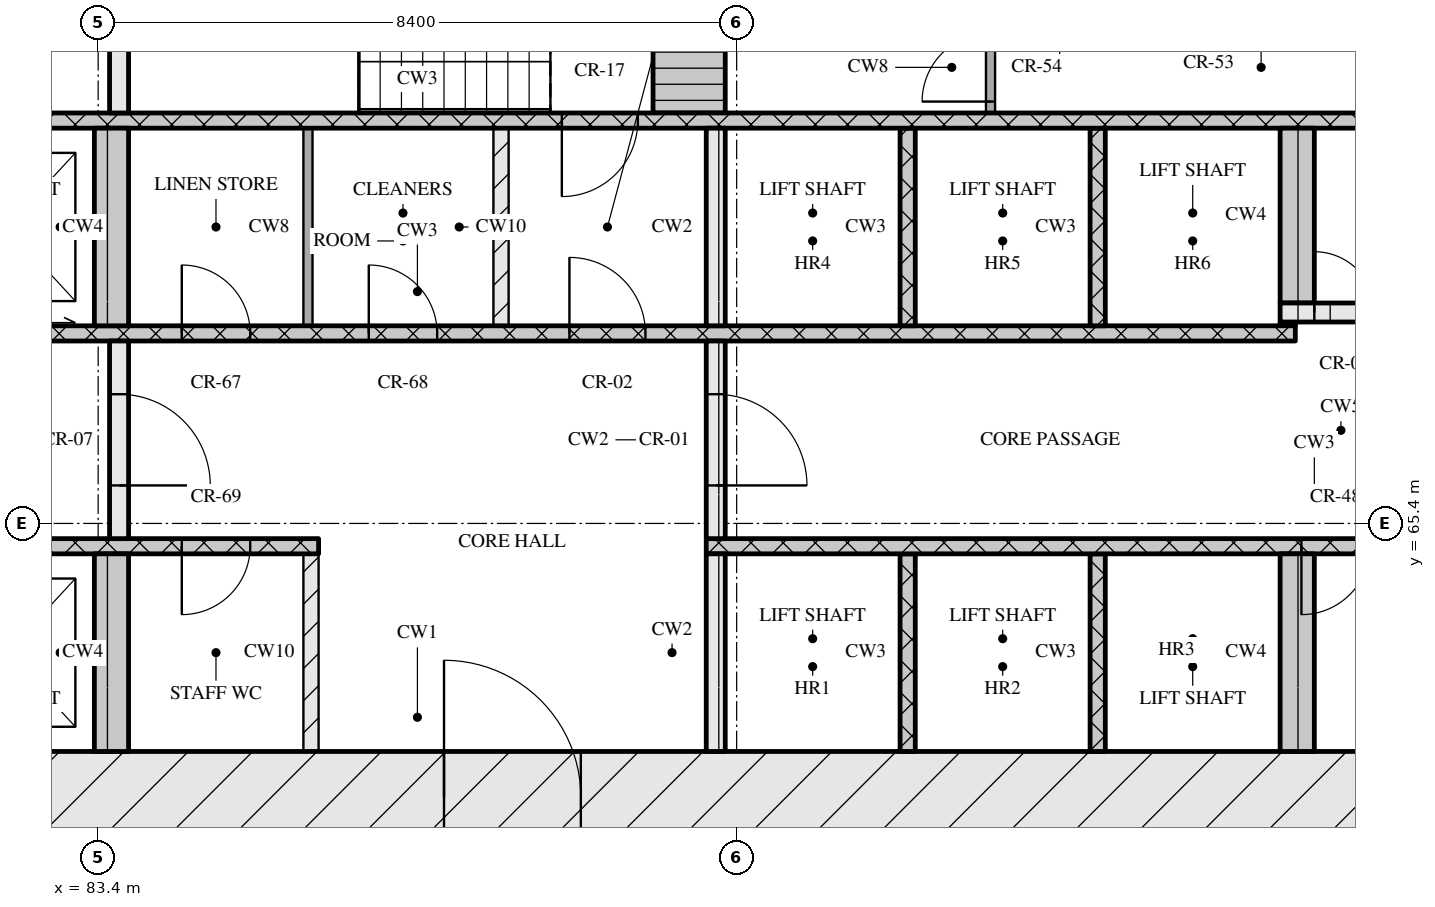
"""IFC4 building model, lengths in metres.
Left out: names, types, materials, properties, quantities, classifications, styles, units other than length and angle.
Written with IfcOpenShell. Run it as: python <this file> out.ifc"""

import sys

from ifc_helpers import new_model, si_unit, direction, frame, frame_2d, origin, place, context, subcontext, project, spatial, rectangle, extrude, element, fill, save


model = new_model("IFC4")
c1 = context("Model", 3, precision=1e-05, world=origin(), true_north=direction((0.0, 1.0)))
c2 = subcontext(c1, "Body", "Model", "MODEL_VIEW")
j1 = project(units=[si_unit("LENGTHUNIT", "METRE"), si_unit("PLANEANGLEUNIT", "RADIAN")], contexts=[c1])
p1 = place(None, origin())
s1 = spatial("IfcSite", under=j1, at=p1, CompositionType="ELEMENT")
p2 = place(p1, origin())
s2 = spatial("IfcBuilding", under=s1, at=p2, CompositionType="ELEMENT")
p3 = place(p2, frame((0.0, 0.0, 58.8)))
s3 = spatial("IfcBuildingStorey", under=s2, at=p3, CompositionType="ELEMENT", Elevation=58.8)
p4 = place(p3, frame((66.6, 61.8, 0.0), z_axis=(0.0, 0.0, 1.0), x_axis=(1.0, 0.0, 0.0)))
e1 = element("IfcWall", 1, at=p4, inside=s3, PredefinedType="SOLIDWALL", context=c2, shape_type="SweptSolid", body=[
    extrude(rectangle(XDim=42.0, YDim=1.2, at=frame_2d((21.0, 0.0))), origin(), (0.0, 0.0, 1.0), 3.32),
])
p5 = place(p4, frame((21.35, 0.0, 0.0)))
e2 = element("IfcOpeningElement", 2, at=p5, cuts=e1, PredefinedType="OPENING", context=c2, shape_type="SweptSolid", body=[
    extrude(rectangle(XDim=1.8, YDim=2.1, at=frame_2d((0.9, 1.05))), frame((0.0, 0.61, 0.0), z_axis=(0.0, -1.0, 0.0), x_axis=(1.0, 0.0, 0.0)), (0.0, 0.0, 1.0), 1.22),
])
p6 = place(p3, frame((83.575, 62.4, 0.0), z_axis=(0.0, 0.0, 1.0), x_axis=(0.0, 1.0, 0.0)))
e3 = element("IfcWall", 3, at=p6, inside=s3, PredefinedType="SOLIDWALL", context=c2, shape_type="SweptSolid", body=[
    extrude(rectangle(XDim=2.6, YDim=0.45, at=frame_2d((1.3, 0.0))), origin(), (0.0, 0.0, 1.0), 3.32),
])
p7 = place(p3, frame((86.2, 62.4, 0.0), z_axis=(0.0, 0.0, 1.0), x_axis=(0.0, 1.0, 0.0)))
e4 = element("IfcWall", 4, at=p7, inside=s3, PredefinedType="PARTITIONING", context=c2, shape_type="SweptSolid", body=[
    extrude(rectangle(XDim=2.6, YDim=0.2, at=frame_2d((1.3, 0.0))), origin(), (0.0, 0.0, 1.0), 3.32),
])
p8 = place(p3, frame((91.525, 62.4, 0.0), z_axis=(0.0, 0.0, 1.0), x_axis=(0.0, 1.0, 0.0)))
e5 = element("IfcWall", 5, at=p8, inside=s3, PredefinedType="SOLIDWALL", context=c2, shape_type="SweptSolid", body=[
    extrude(rectangle(XDim=2.6, YDim=0.25, at=frame_2d((1.3, 0.0))), origin(), (0.0, 0.0, 1.0), 3.32),
])
for number, where, z_axis, x_axis in (
    (6, (94.05, 62.4, 0.0), (0.0, 0.0, 1.0), (0.0, 1.0, 0.0)),
    (7, (96.55, 62.4, 0.0), (0.0, 0.0, 1.0), (0.0, 1.0, 0.0)),
):
    element("IfcWall", number, at=place(p3, frame(where, z_axis=z_axis, x_axis=x_axis)), inside=s3, PredefinedType="SOLIDWALL", context=c2, shape_type="SweptSolid", body=[
        extrude(rectangle(XDim=2.6, YDim=0.2, at=frame_2d((1.3, 0.0))), origin(), (0.0, 0.0, 1.0), 3.32),
    ])
p9 = place(p3, frame((99.175, 62.4, 0.0), z_axis=(0.0, 0.0, 1.0), x_axis=(0.0, 1.0, 0.0)))
e8 = element("IfcWall", 8, at=p9, inside=s3, PredefinedType="SOLIDWALL", context=c2, shape_type="SweptSolid", body=[
    extrude(rectangle(XDim=2.6, YDim=0.45, at=frame_2d((1.3, 0.0))), origin(), (0.0, 0.0, 1.0), 3.32),
])
p10 = place(p3, frame((67.8, 65.1, 0.0), z_axis=(0.0, 0.0, 1.0), x_axis=(1.0, 0.0, 0.0)))
e9 = element("IfcWall", 9, at=p10, inside=s3, PredefinedType="SOLIDWALL", context=c2, shape_type="SweptSolid", body=[
    extrude(rectangle(XDim=18.5, YDim=0.2, at=frame_2d((9.25, 0.0))), origin(), (0.0, 0.0, 1.0), 3.32),
])
p11 = place(p10, frame((7.27, 0.0, 0.0)))
e10 = element("IfcOpeningElement", 10, at=p11, cuts=e9, PredefinedType="OPENING", context=c2, shape_type="SweptSolid", body=[
    extrude(rectangle(XDim=0.9, YDim=2.1, at=frame_2d((0.45, 1.05))), frame((0.0, 0.11, 0.0), z_axis=(0.0, -1.0, 0.0), x_axis=(1.0, 0.0, 0.0)), (0.0, 0.0, 1.0), 0.22),
])
p12 = place(p10, frame((8.85, 0.0, 0.0)))
e11 = element("IfcOpeningElement", 11, at=p12, cuts=e9, PredefinedType="OPENING", context=c2, shape_type="SweptSolid", body=[
    extrude(rectangle(XDim=1.1, YDim=2.1, at=frame_2d((0.55, 1.05))), frame((0.0, 0.11, 0.0), z_axis=(0.0, -1.0, 0.0), x_axis=(1.0, 0.0, 0.0)), (0.0, 0.0, 1.0), 0.22),
])
p13 = place(p10, frame((11.35, 0.0, 0.0)))
e12 = element("IfcOpeningElement", 12, at=p13, cuts=e9, PredefinedType="OPENING", context=c2, shape_type="SweptSolid", body=[
    extrude(rectangle(XDim=1.1, YDim=2.1, at=frame_2d((0.55, 1.05))), frame((0.0, 0.11, 0.0), z_axis=(0.0, -1.0, 0.0), x_axis=(1.0, 0.0, 0.0)), (0.0, 0.0, 1.0), 0.22),
])
p14 = place(p10, frame((13.85, 0.0, 0.0)))
e13 = element("IfcOpeningElement", 13, at=p14, cuts=e9, PredefinedType="OPENING", context=c2, shape_type="SweptSolid", body=[
    extrude(rectangle(XDim=1.1, YDim=2.1, at=frame_2d((0.55, 1.05))), frame((0.0, 0.11, 0.0), z_axis=(0.0, -1.0, 0.0), x_axis=(1.0, 0.0, 0.0)), (0.0, 0.0, 1.0), 0.22),
])
p15 = place(p10, frame((16.7, 0.0, 0.0)))
e14 = element("IfcOpeningElement", 14, at=p15, cuts=e9, PredefinedType="OPENING", context=c2, shape_type="SweptSolid", body=[
    extrude(rectangle(XDim=0.9, YDim=2.1, at=frame_2d((0.45, 1.05))), frame((0.0, 0.11, 0.0), z_axis=(0.0, -1.0, 0.0), x_axis=(1.0, 0.0, 0.0)), (0.0, 0.0, 1.0), 0.22),
])
p16 = place(p3, frame((91.4, 65.1, 0.0), z_axis=(0.0, 0.0, 1.0), x_axis=(1.0, 0.0, 0.0)))
e15 = element("IfcWall", 15, at=p16, inside=s3, PredefinedType="SOLIDWALL", context=c2, shape_type="SweptSolid", body=[
    extrude(rectangle(XDim=16.0, YDim=0.2, at=frame_2d((8.0, 0.0))), origin(), (0.0, 0.0, 1.0), 3.32),
])
p17 = place(p16, frame((7.83, 0.0, 0.0)))
e16 = element("IfcOpeningElement", 16, at=p17, cuts=e15, PredefinedType="OPENING", context=c2, shape_type="SweptSolid", body=[
    extrude(rectangle(XDim=0.9, YDim=2.1, at=frame_2d((0.45, 1.05))), frame((0.0, 0.11, 0.0), z_axis=(0.0, -1.0, 0.0), x_axis=(1.0, 0.0, 0.0)), (0.0, 0.0, 1.0), 0.22),
])
p18 = place(p3, frame((83.675, 65.2, 0.0), z_axis=(0.0, 0.0, 1.0), x_axis=(0.0, 1.0, 0.0)))
e17 = element("IfcWall", 17, at=p18, inside=s3, PredefinedType="SOLIDWALL", context=c2, shape_type="SweptSolid", body=[
    extrude(rectangle(XDim=2.6, YDim=0.25, at=frame_2d((1.3, 0.0))), origin(), (0.0, 0.0, 1.0), 3.32),
])
p19 = place(p18, frame((0.7, 0.0, 0.0)))
e18 = element("IfcOpeningElement", 18, at=p19, cuts=e17, PredefinedType="OPENING", context=c2, shape_type="SweptSolid", body=[
    extrude(rectangle(XDim=1.2, YDim=2.1, at=frame_2d((0.6, 1.05))), frame((0.0, 0.135, 0.0), z_axis=(0.0, -1.0, 0.0), x_axis=(1.0, 0.0, 0.0)), (0.0, 0.0, 1.0), 0.27),
])
p20 = place(p3, frame((91.525, 65.2, 0.0), z_axis=(0.0, 0.0, 1.0), x_axis=(0.0, 1.0, 0.0)))
e19 = element("IfcWall", 19, at=p20, inside=s3, PredefinedType="SOLIDWALL", context=c2, shape_type="SweptSolid", body=[
    extrude(rectangle(XDim=2.6, YDim=0.25, at=frame_2d((1.3, 0.0))), origin(), (0.0, 0.0, 1.0), 3.32),
])
p21 = place(p20, frame((0.7, 0.0, 0.0)))
e20 = element("IfcOpeningElement", 20, at=p21, cuts=e19, PredefinedType="OPENING", context=c2, shape_type="SweptSolid", body=[
    extrude(rectangle(XDim=1.2, YDim=2.1, at=frame_2d((0.6, 1.05))), frame((0.0, 0.135, 0.0), z_axis=(0.0, -1.0, 0.0), x_axis=(1.0, 0.0, 0.0)), (0.0, 0.0, 1.0), 0.27),
])
p22 = place(p3, frame((76.05, 67.9, 0.0), z_axis=(0.0, 0.0, 1.0), x_axis=(1.0, 0.0, 0.0)))
e21 = element("IfcWall", 21, at=p22, inside=s3, PredefinedType="SOLIDWALL", context=c2, shape_type="SweptSolid", body=[
    extrude(rectangle(XDim=23.1, YDim=0.2, at=frame_2d((11.55, 0.0))), origin(), (0.0, 0.0, 1.0), 3.32),
])
p23 = place(p22, frame((0.6, 0.0, 0.0)))
e22 = element("IfcOpeningElement", 22, at=p23, cuts=e21, PredefinedType="OPENING", context=c2, shape_type="SweptSolid", body=[
    extrude(rectangle(XDim=1.1, YDim=2.1, at=frame_2d((0.55, 1.05))), frame((0.0, 0.11, 0.0), z_axis=(0.0, -1.0, 0.0), x_axis=(1.0, 0.0, 0.0)), (0.0, 0.0, 1.0), 0.22),
])
p24 = place(p22, frame((3.1, 0.0, 0.0)))
e23 = element("IfcOpeningElement", 23, at=p24, cuts=e21, PredefinedType="OPENING", context=c2, shape_type="SweptSolid", body=[
    extrude(rectangle(XDim=1.1, YDim=2.1, at=frame_2d((0.55, 1.05))), frame((0.0, 0.11, 0.0), z_axis=(0.0, -1.0, 0.0), x_axis=(1.0, 0.0, 0.0)), (0.0, 0.0, 1.0), 0.22),
])
p25 = place(p22, frame((5.6, 0.0, 0.0)))
e24 = element("IfcOpeningElement", 24, at=p25, cuts=e21, PredefinedType="OPENING", context=c2, shape_type="SweptSolid", body=[
    extrude(rectangle(XDim=1.1, YDim=2.1, at=frame_2d((0.55, 1.05))), frame((0.0, 0.11, 0.0), z_axis=(0.0, -1.0, 0.0), x_axis=(1.0, 0.0, 0.0)), (0.0, 0.0, 1.0), 0.22),
])
p26 = place(p22, frame((8.45, 0.0, 0.0)))
e25 = element("IfcOpeningElement", 25, at=p26, cuts=e21, PredefinedType="OPENING", context=c2, shape_type="SweptSolid", body=[
    extrude(rectangle(XDim=0.9, YDim=2.1, at=frame_2d((0.45, 1.05))), frame((0.0, 0.11, 0.0), z_axis=(0.0, -1.0, 0.0), x_axis=(1.0, 0.0, 0.0)), (0.0, 0.0, 1.0), 0.22),
])
p27 = place(p22, frame((10.91, 0.0, 0.0)))
e26 = element("IfcOpeningElement", 26, at=p27, cuts=e21, PredefinedType="OPENING", context=c2, shape_type="SweptSolid", body=[
    extrude(rectangle(XDim=0.9, YDim=2.1, at=frame_2d((0.45, 1.05))), frame((0.0, 0.11, 0.0), z_axis=(0.0, -1.0, 0.0), x_axis=(1.0, 0.0, 0.0)), (0.0, 0.0, 1.0), 0.22),
])
p28 = place(p22, frame((13.55, 0.0, 0.0)))
e27 = element("IfcOpeningElement", 27, at=p28, cuts=e21, PredefinedType="OPENING", context=c2, shape_type="SweptSolid", body=[
    extrude(rectangle(XDim=1.0, YDim=2.1, at=frame_2d((0.5, 1.05))), frame((0.0, 0.11, 0.0), z_axis=(0.0, -1.0, 0.0), x_axis=(1.0, 0.0, 0.0)), (0.0, 0.0, 1.0), 0.22),
])
p29 = place(p3, frame((83.575, 68.0, 0.0), z_axis=(0.0, 0.0, 1.0), x_axis=(0.0, 1.0, 0.0)))
e28 = element("IfcWall", 28, at=p29, inside=s3, PredefinedType="SOLIDWALL", context=c2, shape_type="SweptSolid", body=[
    extrude(rectangle(XDim=2.6, YDim=0.45, at=frame_2d((1.3, 0.0))), origin(), (0.0, 0.0, 1.0), 3.32),
])
p30 = place(p3, frame((86.16, 68.0, 0.0), z_axis=(0.0, 0.0, 1.0), x_axis=(0.0, 1.0, 0.0)))
e29 = element("IfcWall", 29, at=p30, inside=s3, PredefinedType="PARTITIONING", context=c2, shape_type="SweptSolid", body=[
    extrude(rectangle(XDim=2.6, YDim=0.12, at=frame_2d((1.3, 0.0))), origin(), (0.0, 0.0, 1.0), 3.32),
])
p31 = place(p3, frame((88.7, 68.0, 0.0), z_axis=(0.0, 0.0, 1.0), x_axis=(0.0, 1.0, 0.0)))
e30 = element("IfcWall", 30, at=p31, inside=s3, PredefinedType="PARTITIONING", context=c2, shape_type="SweptSolid", body=[
    extrude(rectangle(XDim=2.6, YDim=0.2, at=frame_2d((1.3, 0.0))), origin(), (0.0, 0.0, 1.0), 3.32),
])
p32 = place(p3, frame((91.525, 68.0, 0.0), z_axis=(0.0, 0.0, 1.0), x_axis=(0.0, 1.0, 0.0)))
e31 = element("IfcWall", 31, at=p32, inside=s3, PredefinedType="SOLIDWALL", context=c2, shape_type="SweptSolid", body=[
    extrude(rectangle(XDim=2.6, YDim=0.25, at=frame_2d((1.3, 0.0))), origin(), (0.0, 0.0, 1.0), 3.32),
])
for number, where, z_axis, x_axis in (
    (32, (94.05, 68.0, 0.0), (0.0, 0.0, 1.0), (0.0, 1.0, 0.0)),
    (33, (96.55, 68.0, 0.0), (0.0, 0.0, 1.0), (0.0, 1.0, 0.0)),
):
    element("IfcWall", number, at=place(p3, frame(where, z_axis=z_axis, x_axis=x_axis)), inside=s3, PredefinedType="SOLIDWALL", context=c2, shape_type="SweptSolid", body=[
        extrude(rectangle(XDim=2.6, YDim=0.2, at=frame_2d((1.3, 0.0))), origin(), (0.0, 0.0, 1.0), 3.32),
    ])
p33 = place(p3, frame((98.95, 68.025, 0.0), z_axis=(0.0, 0.0, 1.0), x_axis=(1.0, 0.0, 0.0)))
e34 = element("IfcWall", 34, at=p33, inside=s3, PredefinedType="SOLIDWALL", context=c2, shape_type="SweptSolid", body=[
    extrude(rectangle(XDim=0.2, YDim=0.05, at=frame_2d((0.1, 0.0))), origin(), (0.0, 0.0, 1.0), 3.32),
])
p34 = place(p3, frame((98.95, 68.175, 0.0), z_axis=(0.0, 0.0, 1.0), x_axis=(1.0, 0.0, 0.0)))
e35 = element("IfcWall", 35, at=p34, inside=s3, PredefinedType="SOLIDWALL", context=c2, shape_type="SweptSolid", body=[
    extrude(rectangle(XDim=8.45, YDim=0.25, at=frame_2d((4.225, 0.0))), origin(), (0.0, 0.0, 1.0), 3.32),
])
p35 = place(p34, frame((0.45, 0.0, 0.0)))
e36 = element("IfcOpeningElement", 36, at=p35, cuts=e35, PredefinedType="OPENING", context=c2, shape_type="SweptSolid", body=[
    extrude(rectangle(XDim=0.8, YDim=2.1, at=frame_2d((0.4, 1.05))), frame((0.0, 0.135, 0.0), z_axis=(0.0, -1.0, 0.0), x_axis=(1.0, 0.0, 0.0)), (0.0, 0.0, 1.0), 0.27),
])
p36 = place(p34, frame((1.75, 0.0, 0.0)))
e37 = element("IfcOpeningElement", 37, at=p36, cuts=e35, PredefinedType="OPENING", context=c2, shape_type="SweptSolid", body=[
    extrude(rectangle(XDim=1.0, YDim=2.1, at=frame_2d((0.5, 1.05))), frame((0.0, 0.135, 0.0), z_axis=(0.0, -1.0, 0.0), x_axis=(1.0, 0.0, 0.0)), (0.0, 0.0, 1.0), 0.27),
])
p37 = place(p3, frame((99.175, 68.3, 0.0), z_axis=(0.0, 0.0, 1.0), x_axis=(0.0, 1.0, 0.0)))
e38 = element("IfcWall", 38, at=p37, inside=s3, PredefinedType="SOLIDWALL", context=c2, shape_type="SweptSolid", body=[
    extrude(rectangle(XDim=2.3, YDim=0.45, at=frame_2d((1.15, 0.0))), origin(), (0.0, 0.0, 1.0), 3.32),
])
p38 = place(p3, frame((67.8, 70.7, 0.0), z_axis=(0.0, 0.0, 1.0), x_axis=(1.0, 0.0, 0.0)))
e39 = element("IfcWall", 39, at=p38, inside=s3, PredefinedType="SOLIDWALL", context=c2, shape_type="SweptSolid", body=[
    extrude(rectangle(XDim=39.6, YDim=0.2, at=frame_2d((19.8, 0.0))), origin(), (0.0, 0.0, 1.0), 3.32),
])
p39 = place(p38, frame((0.65, 0.0, 0.0)))
e40 = element("IfcOpeningElement", 40, at=p39, cuts=e39, PredefinedType="OPENING", context=c2, shape_type="SweptSolid", body=[
    extrude(rectangle(XDim=1.1, YDim=2.1, at=frame_2d((0.55, 1.05))), frame((0.0, 0.11, 0.0), z_axis=(0.0, -1.0, 0.0), x_axis=(1.0, 0.0, 0.0)), (0.0, 0.0, 1.0), 0.22),
])
p40 = place(p38, frame((3.25, 0.0, 0.0)))
e41 = element("IfcOpeningElement", 41, at=p40, cuts=e39, PredefinedType="OPENING", context=c2, shape_type="SweptSolid", body=[
    extrude(rectangle(XDim=1.1, YDim=2.1, at=frame_2d((0.55, 1.05))), frame((0.0, 0.11, 0.0), z_axis=(0.0, -1.0, 0.0), x_axis=(1.0, 0.0, 0.0)), (0.0, 0.0, 1.0), 0.22),
])
p41 = place(p38, frame((5.9, 0.0, 0.0)))
e42 = element("IfcOpeningElement", 42, at=p41, cuts=e39, PredefinedType="OPENING", context=c2, shape_type="SweptSolid", body=[
    extrude(rectangle(XDim=1.0, YDim=2.1, at=frame_2d((0.5, 1.05))), frame((0.0, 0.11, 0.0), z_axis=(0.0, -1.0, 0.0), x_axis=(1.0, 0.0, 0.0)), (0.0, 0.0, 1.0), 0.22),
])
p42 = place(p38, frame((21.7, 0.0, 0.0)))
e43 = element("IfcOpeningElement", 43, at=p42, cuts=e39, PredefinedType="OPENING", context=c2, shape_type="SweptSolid", body=[
    extrude(rectangle(XDim=1.0, YDim=2.1, at=frame_2d((0.5, 1.05))), frame((0.0, 0.11, 0.0), z_axis=(0.0, -1.0, 0.0), x_axis=(1.0, 0.0, 0.0)), (0.0, 0.0, 1.0), 0.22),
])
p43 = place(p38, frame((32.7, 0.0, 0.0)))
e44 = element("IfcOpeningElement", 44, at=p43, cuts=e39, PredefinedType="OPENING", context=c2, shape_type="SweptSolid", body=[
    extrude(rectangle(XDim=1.0, YDim=2.1, at=frame_2d((0.5, 1.05))), frame((0.0, 0.11, 0.0), z_axis=(0.0, -1.0, 0.0), x_axis=(1.0, 0.0, 0.0)), (0.0, 0.0, 1.0), 0.22),
])
p44 = place(p38, frame((35.25, 0.0, 0.0)))
e45 = element("IfcOpeningElement", 45, at=p44, cuts=e39, PredefinedType="OPENING", context=c2, shape_type="SweptSolid", body=[
    extrude(rectangle(XDim=1.1, YDim=2.1, at=frame_2d((0.55, 1.05))), frame((0.0, 0.11, 0.0), z_axis=(0.0, -1.0, 0.0), x_axis=(1.0, 0.0, 0.0)), (0.0, 0.0, 1.0), 0.22),
])
p45 = place(p38, frame((37.85, 0.0, 0.0)))
e46 = element("IfcOpeningElement", 46, at=p45, cuts=e39, PredefinedType="OPENING", context=c2, shape_type="SweptSolid", body=[
    extrude(rectangle(XDim=1.1, YDim=2.1, at=frame_2d((0.55, 1.05))), frame((0.0, 0.11, 0.0), z_axis=(0.0, -1.0, 0.0), x_axis=(1.0, 0.0, 0.0)), (0.0, 0.0, 1.0), 0.22),
])
p46 = place(p3, frame((83.675, 70.8, 0.0), z_axis=(0.0, 0.0, 1.0), x_axis=(0.0, 1.0, 0.0)))
e47 = element("IfcWall", 47, at=p46, inside=s3, PredefinedType="SOLIDWALL", context=c2, shape_type="SweptSolid", body=[
    extrude(rectangle(XDim=2.95, YDim=0.25, at=frame_2d((1.475, 0.0))), origin(), (0.0, 0.0, 1.0), 3.32),
])
p47 = place(p3, frame((91.175, 70.8, 0.0), z_axis=(0.0, 0.0, 1.0), x_axis=(0.0, 1.0, 0.0)))
e48 = element("IfcWall", 48, at=p47, inside=s3, PredefinedType="SOLIDWALL", context=c2, shape_type="SweptSolid", body=[
    extrude(rectangle(XDim=2.95, YDim=0.95, at=frame_2d((1.475, 0.0))), origin(), (0.0, 0.0, 1.0), 3.32),
])
p48 = place(p3, frame((95.14, 70.8, 0.0), z_axis=(0.0, 0.0, 1.0), x_axis=(0.0, 1.0, 0.0)))
e49 = element("IfcWall", 49, at=p48, inside=s3, PredefinedType="PARTITIONING", context=c2, shape_type="SweptSolid", body=[
    extrude(rectangle(XDim=1.2, YDim=0.12, at=frame_2d((0.6, 0.0))), origin(), (0.0, 0.0, 1.0), 3.32),
])
p49 = place(p48, frame((0.15, 0.0, 0.0)))
e50 = element("IfcOpeningElement", 50, at=p49, cuts=e49, PredefinedType="OPENING", context=c2, shape_type="SweptSolid", body=[
    extrude(rectangle(XDim=0.9, YDim=2.1, at=frame_2d((0.45, 1.05))), frame((0.0, 0.07, 0.0), z_axis=(0.0, -1.0, 0.0), x_axis=(1.0, 0.0, 0.0)), (0.0, 0.0, 1.0), 0.14),
])
p50 = place(p5, origin())
e51 = element("IfcDoor", 51, at=p50, inside=s3, OperationType="DOUBLE_DOOR_SINGLE_SWING", PredefinedType="DOOR", context=c2, shape_type="SweptSolid", body=[
    extrude(rectangle(XDim=1.8, YDim=2.1, at=frame_2d((0.9, 1.05))), frame((0.0, 0.025, 0.0), z_axis=(0.0, -1.0, 0.0), x_axis=(1.0, 0.0, 0.0)), (0.0, 0.0, 1.0), 0.05),
])
fill(e2, e51)
p51 = place(p15, origin())
e52 = element("IfcDoor", 52, at=p51, inside=s3, OperationType="SINGLE_SWING_RIGHT", PredefinedType="DOOR", context=c2, shape_type="SweptSolid", body=[
    extrude(rectangle(XDim=0.9, YDim=2.1, at=frame_2d((0.45, 1.05))), frame((0.0, 0.025, 0.0), z_axis=(0.0, -1.0, 0.0), x_axis=(1.0, 0.0, 0.0)), (0.0, 0.0, 1.0), 0.05),
])
fill(e14, e52)
p52 = place(p17, origin())
e53 = element("IfcDoor", 53, at=p52, inside=s3, OperationType="SINGLE_SWING_RIGHT", PredefinedType="DOOR", context=c2, shape_type="SweptSolid", body=[
    extrude(rectangle(XDim=0.9, YDim=2.1, at=frame_2d((0.45, 1.05))), frame((0.0, 0.025, 0.0), z_axis=(0.0, -1.0, 0.0), x_axis=(1.0, 0.0, 0.0)), (0.0, 0.0, 1.0), 0.05),
])
fill(e16, e53)
p53 = place(p19, origin())
e54 = element("IfcDoor", 54, at=p53, inside=s3, OperationType="SINGLE_SWING_RIGHT", PredefinedType="DOOR", context=c2, shape_type="SweptSolid", body=[
    extrude(rectangle(XDim=1.2, YDim=2.1, at=frame_2d((0.6, 1.05))), frame((0.0, 0.025, 0.0), z_axis=(0.0, -1.0, 0.0), x_axis=(1.0, 0.0, 0.0)), (0.0, 0.0, 1.0), 0.05),
])
fill(e18, e54)
p54 = place(p21, origin())
e55 = element("IfcDoor", 55, at=p54, inside=s3, OperationType="SINGLE_SWING_RIGHT", PredefinedType="DOOR", context=c2, shape_type="SweptSolid", body=[
    extrude(rectangle(XDim=1.2, YDim=2.1, at=frame_2d((0.6, 1.05))), frame((0.0, 0.025, 0.0), z_axis=(0.0, -1.0, 0.0), x_axis=(1.0, 0.0, 0.0)), (0.0, 0.0, 1.0), 0.05),
])
fill(e20, e55)
p55 = place(p26, origin())
e56 = element("IfcDoor", 56, at=p55, inside=s3, OperationType="SINGLE_SWING_LEFT", PredefinedType="DOOR", context=c2, shape_type="SweptSolid", body=[
    extrude(rectangle(XDim=0.9, YDim=2.1, at=frame_2d((0.45, 1.05))), frame((0.0, 0.025, 0.0), z_axis=(0.0, -1.0, 0.0), x_axis=(1.0, 0.0, 0.0)), (0.0, 0.0, 1.0), 0.05),
])
fill(e25, e56)
p56 = place(p27, origin())
e57 = element("IfcDoor", 57, at=p56, inside=s3, OperationType="SINGLE_SWING_LEFT", PredefinedType="DOOR", context=c2, shape_type="SweptSolid", body=[
    extrude(rectangle(XDim=0.9, YDim=2.1, at=frame_2d((0.45, 1.05))), frame((0.0, 0.025, 0.0), z_axis=(0.0, -1.0, 0.0), x_axis=(1.0, 0.0, 0.0)), (0.0, 0.0, 1.0), 0.05),
])
fill(e26, e57)
p57 = place(p28, origin())
e58 = element("IfcDoor", 58, at=p57, inside=s3, OperationType="SINGLE_SWING_LEFT", PredefinedType="DOOR", context=c2, shape_type="SweptSolid", body=[
    extrude(rectangle(XDim=1.0, YDim=2.1, at=frame_2d((0.5, 1.05))), frame((0.0, 0.025, 0.0), z_axis=(0.0, -1.0, 0.0), x_axis=(1.0, 0.0, 0.0)), (0.0, 0.0, 1.0), 0.05),
])
fill(e27, e58)
p58 = place(p35, origin())
e59 = element("IfcDoor", 59, at=p58, inside=s3, OperationType="SINGLE_SWING_LEFT", PredefinedType="DOOR", context=c2, shape_type="SweptSolid", body=[
    extrude(rectangle(XDim=0.8, YDim=2.1, at=frame_2d((0.4, 1.05))), frame((0.0, 0.025, 0.0), z_axis=(0.0, -1.0, 0.0), x_axis=(1.0, 0.0, 0.0)), (0.0, 0.0, 1.0), 0.05),
])
fill(e36, e59)
p59 = place(p42, origin())
e60 = element("IfcDoor", 60, at=p59, inside=s3, OperationType="SINGLE_SWING_RIGHT", PredefinedType="DOOR", context=c2, shape_type="SweptSolid", body=[
    extrude(rectangle(XDim=1.0, YDim=2.1, at=frame_2d((0.5, 1.05))), frame((0.0, 0.025, 0.0), z_axis=(0.0, -1.0, 0.0), x_axis=(1.0, 0.0, 0.0)), (0.0, 0.0, 1.0), 0.05),
])
fill(e43, e60)
p60 = place(p49, origin())
e61 = element("IfcDoor", 61, at=p60, inside=s3, OperationType="SINGLE_SWING_LEFT", PredefinedType="DOOR", context=c2, shape_type="SweptSolid", body=[
    extrude(rectangle(XDim=0.9, YDim=2.1, at=frame_2d((0.45, 1.05))), frame((0.0, 0.025, 0.0), z_axis=(0.0, -1.0, 0.0), x_axis=(1.0, 0.0, 0.0)), (0.0, 0.0, 1.0), 0.05),
])
fill(e50, e61)
save(model, sys.argv[1])
